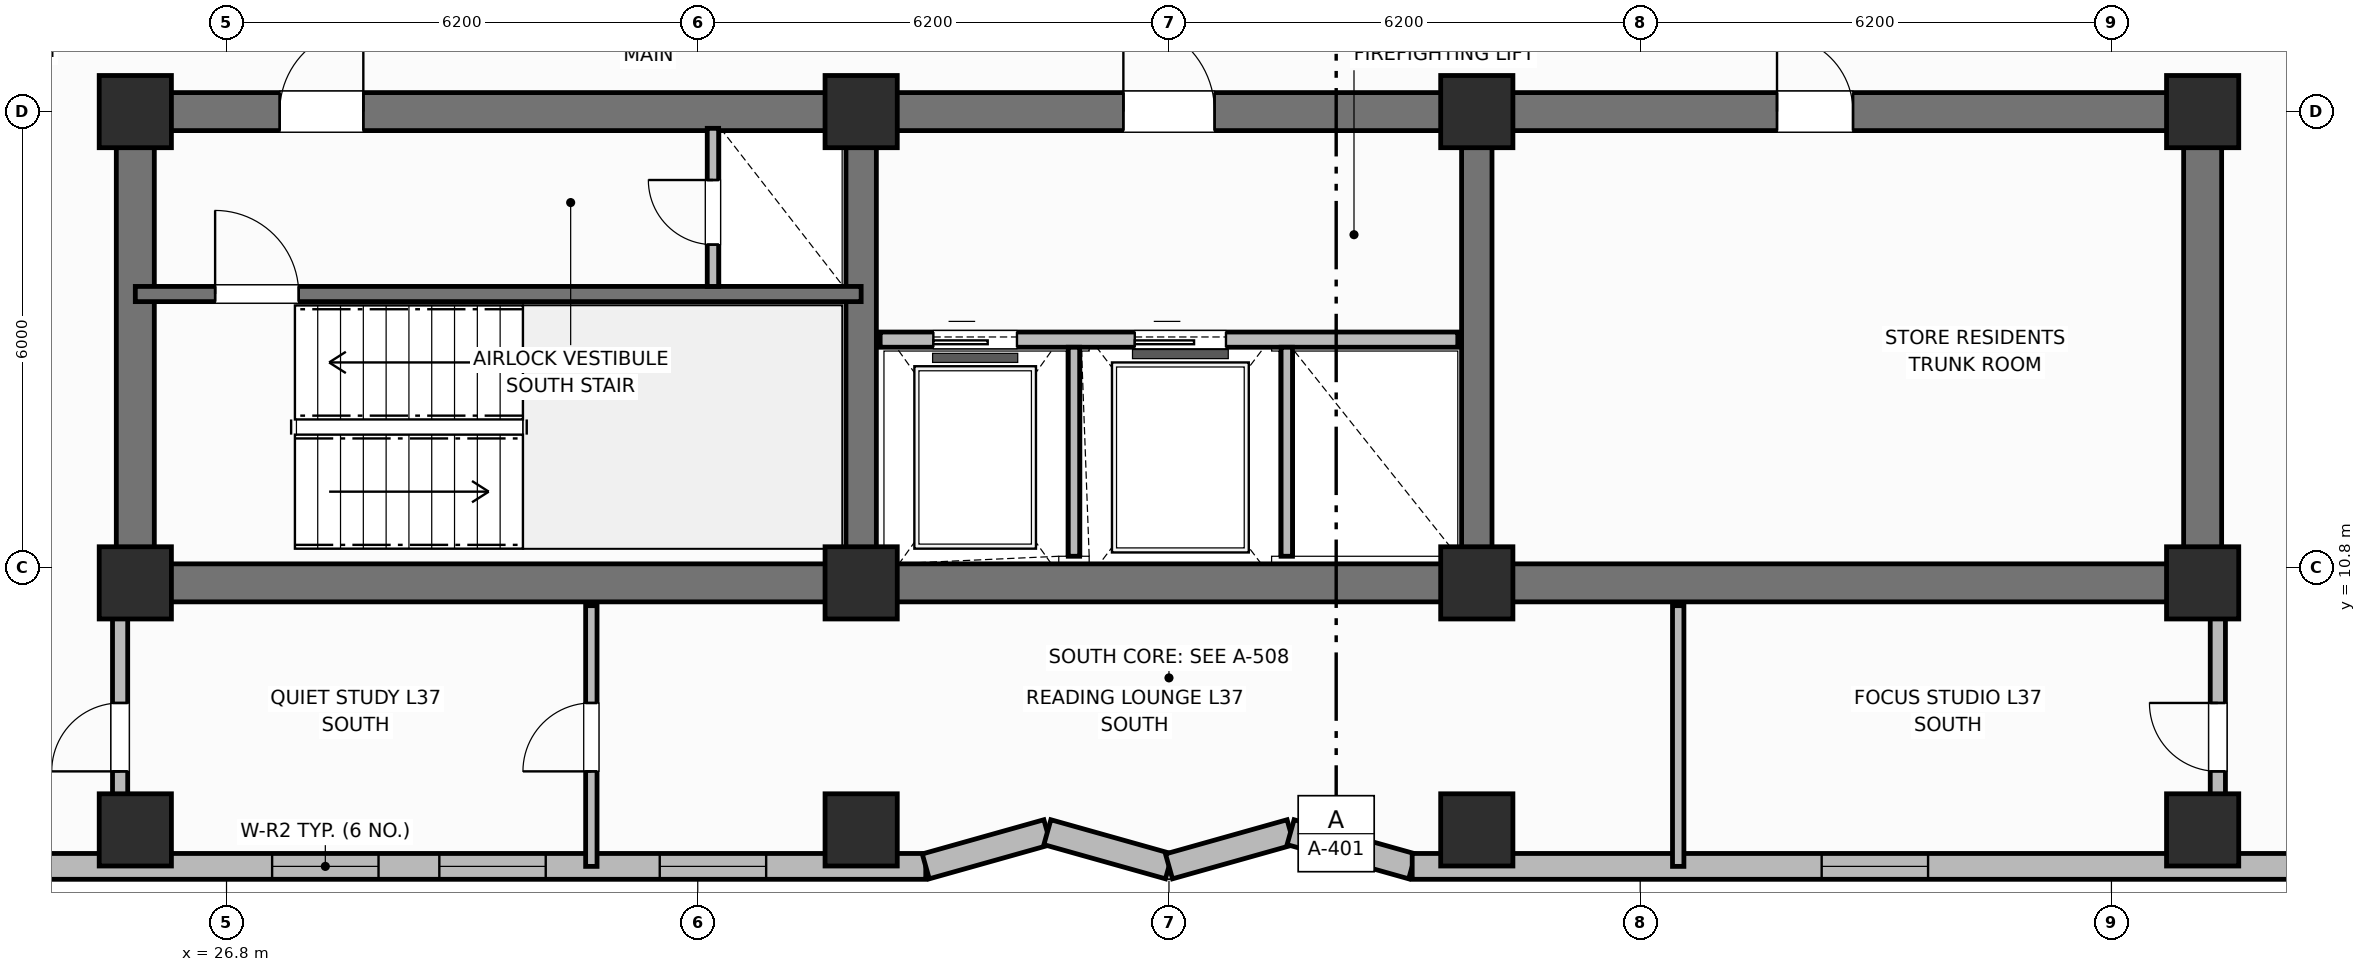
"""IFC4 building model, lengths in metres.
Left out: names, types, materials, properties, quantities, classifications, styles, units other than length and angle.
Written with IfcOpenShell. Run it as: python <this file> out.ifc"""

import sys

from ifc_helpers import new_model, si_unit, direction, frame, frame_2d, origin, origin_2d, place, context, subcontext, project, spatial, rectangle, extrude, element, fill, save


model = new_model("IFC4")
c1 = context("Model", 3, precision=1e-05, world=origin(), true_north=direction((0.0, 1.0)))
c2 = subcontext(c1, "Body", "Model", "MODEL_VIEW")
j1 = project(units=[si_unit("LENGTHUNIT", "METRE"), si_unit("PLANEANGLEUNIT", "RADIAN")], contexts=[c1])
p1 = place(None, origin())
s1 = spatial("IfcSite", under=j1, at=p1, CompositionType="ELEMENT")
p2 = place(p1, origin())
s2 = spatial("IfcBuilding", under=s1, at=p2, CompositionType="ELEMENT")
p3 = place(p2, frame((0.0, 0.0, 151.5)))
s3 = spatial("IfcBuildingStorey", under=s2, at=p3, CompositionType="ELEMENT", Elevation=151.5)
p4 = place(p3, frame((52.8, 10.6, 0.0), z_axis=(0.0, 0.0, 1.0), x_axis=(-1.0, 0.0, 0.0)))
e1 = element("IfcWall", 1, at=p4, inside=s3, PredefinedType="SHEAR", context=c2, shape_type="SweptSolid", body=[
    extrude(rectangle(XDim=27.2, YDim=0.5, at=frame_2d((13.6, 0.0))), origin(), (0.0, 0.0, 1.0), 3.7),
])
for number, where, z_axis, x_axis in (
    (2, (25.6, 10.85, 0.0), (0.0, 0.0, 1.0), (0.0, 1.0, 0.0)),
    (3, (52.8, 10.85, 0.0), (0.0, 0.0, 1.0), (0.0, 1.0, 0.0)),
):
    element("IfcWall", number, at=place(p3, frame(where, z_axis=z_axis, x_axis=x_axis)), inside=s3, PredefinedType="SHEAR", context=c2, shape_type="SweptSolid", body=[
        extrude(rectangle(XDim=5.7, YDim=0.5, at=frame_2d((2.85, 0.0))), origin(), (0.0, 0.0, 1.0), 3.7),
    ])
p5 = place(p3, frame((25.6, 16.8, 0.0), z_axis=(0.0, 0.0, 1.0), x_axis=(1.0, 0.0, 0.0)))
e4 = element("IfcWall", 4, at=p5, inside=s3, PredefinedType="SHEAR", context=c2, shape_type="SweptSolid", body=[
    extrude(rectangle(XDim=27.2, YDim=0.5, at=frame_2d((13.6, 0.0))), origin(), (0.0, 0.0, 1.0), 3.7),
])
p6 = place(p5, frame((1.9, 0.0, 0.0)))
e5 = element("IfcOpeningElement", 5, at=p6, cuts=e4, PredefinedType="OPENING", context=c2, shape_type="SweptSolid", body=[
    extrude(rectangle(XDim=1.1, YDim=2.15, at=frame_2d((0.55, 1.075))), frame((0.0, 0.26, 0.0), z_axis=(0.0, -1.0, 0.0), x_axis=(1.0, 0.0, 0.0)), (0.0, 0.0, 1.0), 0.52),
])
p7 = place(p5, frame((13.0, 0.0, 0.0)))
e6 = element("IfcOpeningElement", 6, at=p7, cuts=e4, PredefinedType="OPENING", context=c2, shape_type="SweptSolid", body=[
    extrude(rectangle(XDim=1.2, YDim=2.15, at=frame_2d((0.6, 1.075))), frame((0.0, 0.26, 0.0), z_axis=(0.0, -1.0, 0.0), x_axis=(1.0, 0.0, 0.0)), (0.0, 0.0, 1.0), 0.52),
])
p8 = place(p5, frame((21.6, 0.0, 0.0)))
e7 = element("IfcOpeningElement", 7, at=p8, cuts=e4, PredefinedType="OPENING", context=c2, shape_type="SweptSolid", body=[
    extrude(rectangle(XDim=1.0, YDim=2.15, at=frame_2d((0.5, 1.075))), frame((0.0, 0.26, 0.0), z_axis=(0.0, -1.0, 0.0), x_axis=(1.0, 0.0, 0.0)), (0.0, 0.0, 1.0), 0.52),
])
for number, where, z_axis, x_axis in (
    (8, (35.15, 10.85, 0.0), (0.0, 0.0, 1.0), (0.0, 1.0, 0.0)),
    (9, (43.25, 10.85, 0.0), (0.0, 0.0, 1.0), (0.0, 1.0, 0.0)),
):
    element("IfcWall", number, at=place(p3, frame(where, z_axis=z_axis, x_axis=x_axis)), inside=s3, PredefinedType="SHEAR", context=c2, shape_type="SweptSolid", body=[
        extrude(rectangle(XDim=5.7, YDim=0.4, at=frame_2d((2.85, 0.0))), origin(), (0.0, 0.0, 1.0), 3.7),
    ])
for number, where, z_axis, x_axis in (
    (10, (25.6, 10.6, 0.0), (0.0, 0.0, 1.0), (1.0, 0.0, 0.0)),
    (11, (25.6, 16.8, 0.0), (0.0, 0.0, 1.0), (1.0, 0.0, 0.0)),
    (12, (35.15, 10.6, 0.0), (0.0, 0.0, 1.0), (1.0, 0.0, 0.0)),
    (13, (35.15, 16.8, 0.0), (0.0, 0.0, 1.0), (1.0, 0.0, 0.0)),
    (14, (43.25, 10.6, 0.0), (0.0, 0.0, 1.0), (1.0, 0.0, 0.0)),
    (15, (43.25, 16.8, 0.0), (0.0, 0.0, 1.0), (1.0, 0.0, 0.0)),
    (16, (52.8, 10.6, 0.0), (0.0, 0.0, 1.0), (1.0, 0.0, 0.0)),
    (17, (52.8, 16.8, 0.0), (0.0, 0.0, 1.0), (1.0, 0.0, 0.0)),
    (18, (25.6, 7.35, 0.0), (0.0, 0.0, 1.0), (1.0, 0.0, 0.0)),
    (19, (35.15, 7.35, 0.0), (0.0, 0.0, 1.0), (1.0, 0.0, 0.0)),
    (20, (43.25, 7.35, 0.0), (0.0, 0.0, 1.0), (1.0, 0.0, 0.0)),
    (21, (52.8, 7.35, 0.0), (0.0, 0.0, 1.0), (1.0, 0.0, 0.0)),
):
    element("IfcColumn", number, at=place(p3, frame(where, z_axis=z_axis, x_axis=x_axis)), inside=s3, PredefinedType="COLUMN", context=c2, shape_type="SweptSolid", body=[
        extrude(rectangle(XDim=0.95, YDim=0.95, at=origin_2d()), origin(), (0.0, 0.0, 1.0), 3.7),
    ])
p9 = place(p3, frame((20.2, 6.87, 0.0), z_axis=(0.0, 0.0, 1.0), x_axis=(1.0, 0.0, 0.0)))
e22 = element("IfcWall", 22, at=p9, inside=s3, PredefinedType="SOLIDWALL", context=c2, shape_type="SweptSolid", body=[
    extrude(rectangle(XDim=15.8, YDim=0.34, at=frame_2d((7.9, 0.0))), origin(), (0.0, 0.0, 1.0), 2.72),
])
p10 = place(p9, frame((7.2, 0.0, 0.75)))
e23 = element("IfcOpeningElement", 23, at=p10, cuts=e22, PredefinedType="OPENING", context=c2, shape_type="SweptSolid", body=[
    extrude(rectangle(XDim=1.4, YDim=1.85, at=frame_2d((0.7, 0.925))), frame((0.0, 0.18, 0.0), z_axis=(0.0, -1.0, 0.0), x_axis=(1.0, 0.0, 0.0)), (0.0, 0.0, 1.0), 0.36),
])
p11 = place(p9, frame((9.4, 0.0, 0.75)))
e24 = element("IfcOpeningElement", 24, at=p11, cuts=e22, PredefinedType="OPENING", context=c2, shape_type="SweptSolid", body=[
    extrude(rectangle(XDim=1.4, YDim=1.85, at=frame_2d((0.7, 0.925))), frame((0.0, 0.18, 0.0), z_axis=(0.0, -1.0, 0.0), x_axis=(1.0, 0.0, 0.0)), (0.0, 0.0, 1.0), 0.36),
])
p12 = place(p9, frame((12.3, 0.0, 0.75)))
e25 = element("IfcOpeningElement", 25, at=p12, cuts=e22, PredefinedType="OPENING", context=c2, shape_type="SweptSolid", body=[
    extrude(rectangle(XDim=1.4, YDim=1.85, at=frame_2d((0.7, 0.925))), frame((0.0, 0.18, 0.0), z_axis=(0.0, -1.0, 0.0), x_axis=(1.0, 0.0, 0.0)), (0.0, 0.0, 1.0), 0.36),
])
p13 = place(p3, frame((36.0, 6.87, 0.0), z_axis=(0.0, 0.0, 1.0), x_axis=(0.962662902433, 0.270703040766, 0.0)))
e26 = element("IfcWall", 26, at=p13, inside=s3, PredefinedType="SOLIDWALL", context=c2, shape_type="SweptSolid", body=[
    extrude(rectangle(XDim=1.662, YDim=0.34, at=frame_2d((0.831, 0.0))), origin(), (0.0, 0.0, 1.0), 2.72),
])
p14 = place(p3, frame((37.6, 7.32, 0.0), z_axis=(0.0, 0.0, 1.0), x_axis=(0.962652136636, -0.270741322725, 0.0)))
e27 = element("IfcWall", 27, at=p14, inside=s3, PredefinedType="SOLIDWALL", context=c2, shape_type="SweptSolid", body=[
    extrude(rectangle(XDim=1.662, YDim=0.34, at=frame_2d((0.831, 0.0))), origin(), (0.0, 0.0, 1.0), 2.72),
])
p15 = place(p3, frame((39.2, 6.87, 0.0), z_axis=(0.0, 0.0, 1.0), x_axis=(0.962662902433, 0.270703040766, 0.0)))
e28 = element("IfcWall", 28, at=p15, inside=s3, PredefinedType="SOLIDWALL", context=c2, shape_type="SweptSolid", body=[
    extrude(rectangle(XDim=1.662, YDim=0.34, at=frame_2d((0.831, 0.0))), origin(), (0.0, 0.0, 1.0), 2.72),
])
p16 = place(p3, frame((40.8, 7.32, 0.0), z_axis=(0.0, 0.0, 1.0), x_axis=(0.962652136636, -0.270741322725, 0.0)))
e29 = element("IfcWall", 29, at=p16, inside=s3, PredefinedType="SOLIDWALL", context=c2, shape_type="SweptSolid", body=[
    extrude(rectangle(XDim=1.662, YDim=0.34, at=frame_2d((0.831, 0.0))), origin(), (0.0, 0.0, 1.0), 2.72),
])
p17 = place(p3, frame((42.4, 6.87, 0.0), z_axis=(0.0, 0.0, 1.0), x_axis=(1.0, 0.0, 0.0)))
e30 = element("IfcWall", 30, at=p17, inside=s3, PredefinedType="SOLIDWALL", context=c2, shape_type="SweptSolid", body=[
    extrude(rectangle(XDim=15.8, YDim=0.34, at=frame_2d((7.9, 0.0))), origin(), (0.0, 0.0, 1.0), 2.72),
])
p18 = place(p17, frame((5.387, 0.0, 0.75)))
e31 = element("IfcOpeningElement", 31, at=p18, cuts=e30, PredefinedType="OPENING", context=c2, shape_type="SweptSolid", body=[
    extrude(rectangle(XDim=1.4, YDim=1.85, at=frame_2d((0.7, 0.925))), frame((0.0, 0.18, 0.0), z_axis=(0.0, -1.0, 0.0), x_axis=(1.0, 0.0, 0.0)), (0.0, 0.0, 1.0), 0.36),
])
p19 = place(p3, frame((25.6, 14.4, 0.0), z_axis=(0.0, 0.0, 1.0), x_axis=(1.0, 0.0, 0.0)))
e32 = element("IfcWall", 32, at=p19, inside=s3, PredefinedType="SHEAR", context=c2, shape_type="SweptSolid", body=[
    extrude(rectangle(XDim=9.55, YDim=0.2, at=frame_2d((4.775, 0.0))), origin(), (0.0, 0.0, 1.0), 3.7),
])
p20 = place(p19, frame((1.05, 0.0, 0.0)))
e33 = element("IfcOpeningElement", 33, at=p20, cuts=e32, PredefinedType="OPENING", context=c2, shape_type="SweptSolid", body=[
    extrude(rectangle(XDim=1.1, YDim=2.15, at=frame_2d((0.55, 1.075))), frame((0.0, 0.11, 0.0), z_axis=(0.0, -1.0, 0.0), x_axis=(1.0, 0.0, 0.0)), (0.0, 0.0, 1.0), 0.22),
])
p21 = place(p3, frame((33.2, 14.5, 0.0), z_axis=(0.0, 0.0, 1.0), x_axis=(0.0, 1.0, 0.0)))
e34 = element("IfcWall", 34, at=p21, inside=s3, PredefinedType="PARTITIONING", context=c2, shape_type="SweptSolid", body=[
    extrude(rectangle(XDim=2.08, YDim=0.15, at=frame_2d((1.04, 0.0))), origin(), (0.0, 0.0, 1.0), 2.55),
])
p22 = place(p21, frame((0.55, 0.0, 0.0)))
e35 = element("IfcOpeningElement", 35, at=p22, cuts=e34, PredefinedType="OPENING", context=c2, shape_type="SweptSolid", body=[
    extrude(rectangle(XDim=0.85, YDim=2.05, at=frame_2d((0.425, 1.025))), frame((0.0, 0.085, 0.0), z_axis=(0.0, -1.0, 0.0), x_axis=(1.0, 0.0, 0.0)), (0.0, 0.0, 1.0), 0.17),
])
p23 = place(p3, frame((35.4, 13.8, 0.0), z_axis=(0.0, 0.0, 1.0), x_axis=(1.0, 0.0, 0.0)))
e36 = element("IfcWall", 36, at=p23, inside=s3, PredefinedType="PARTITIONING", context=c2, shape_type="SweptSolid", body=[
    extrude(rectangle(XDim=7.6, YDim=0.2, at=frame_2d((3.8, 0.0))), origin(), (0.0, 0.0, 1.0), 2.32),
])
p24 = place(p23, frame((0.7, 0.0, 0.0)))
e37 = element("IfcOpeningElement", 37, at=p24, cuts=e36, PredefinedType="OPENING", context=c2, shape_type="SweptSolid", body=[
    extrude(rectangle(XDim=1.1, YDim=2.15, at=frame_2d((0.55, 1.075))), frame((0.0, 0.11, 0.0), z_axis=(0.0, -1.0, 0.0), x_axis=(1.0, 0.0, 0.0)), (0.0, 0.0, 1.0), 0.22),
])
p25 = place(p23, frame((3.35, 0.0, 0.0)))
e38 = element("IfcOpeningElement", 38, at=p25, cuts=e36, PredefinedType="OPENING", context=c2, shape_type="SweptSolid", body=[
    extrude(rectangle(XDim=1.2, YDim=2.15, at=frame_2d((0.6, 1.075))), frame((0.0, 0.11, 0.0), z_axis=(0.0, -1.0, 0.0), x_axis=(1.0, 0.0, 0.0)), (0.0, 0.0, 1.0), 0.22),
])
for number, where, z_axis, x_axis in (
    (39, (37.95, 10.95, 0.0), (0.0, 0.0, 1.0), (0.0, 1.0, 0.0)),
    (40, (40.75, 10.95, 0.0), (0.0, 0.0, 1.0), (0.0, 1.0, 0.0)),
):
    element("IfcWall", number, at=place(p3, frame(where, z_axis=z_axis, x_axis=x_axis)), inside=s3, PredefinedType="PARTITIONING", context=c2, shape_type="SweptSolid", body=[
        extrude(rectangle(XDim=2.75, YDim=0.15, at=frame_2d((1.375, 0.0))), origin(), (0.0, 0.0, 1.0), 2.55),
    ])
p26 = place(p3, frame((31.6, 6.87, 0.0), z_axis=(0.0, 0.0, 1.0), x_axis=(0.0, 1.0, 0.0)))
e41 = element("IfcWall", 41, at=p26, inside=s3, PredefinedType="PARTITIONING", context=c2, shape_type="SweptSolid", body=[
    extrude(rectangle(XDim=3.43, YDim=0.15, at=frame_2d((1.715, 0.0))), origin(), (0.0, 0.0, 1.0), 2.55),
])
p27 = place(p26, frame((1.25, 0.0, 0.0)))
e42 = element("IfcOpeningElement", 42, at=p27, cuts=e41, PredefinedType="OPENING", context=c2, shape_type="SweptSolid", body=[
    extrude(rectangle(XDim=0.9, YDim=2.1, at=frame_2d((0.45, 1.05))), frame((0.0, 0.085, 0.0), z_axis=(0.0, -1.0, 0.0), x_axis=(1.0, 0.0, 0.0)), (0.0, 0.0, 1.0), 0.17),
])
p28 = place(p3, frame((45.9, 6.87, 0.0), z_axis=(0.0, 0.0, 1.0), x_axis=(0.0, 1.0, 0.0)))
e43 = element("IfcWall", 43, at=p28, inside=s3, PredefinedType="PARTITIONING", context=c2, shape_type="SweptSolid", body=[
    extrude(rectangle(XDim=3.43, YDim=0.15, at=frame_2d((1.715, 0.0))), origin(), (0.0, 0.0, 1.0), 2.55),
])
p29 = place(p3, frame((25.4, 7.47, 0.0), z_axis=(0.0, 0.0, 1.0), x_axis=(0.0, 1.0, 0.0)))
e44 = element("IfcWall", 44, at=p29, inside=s3, PredefinedType="PARTITIONING", context=c2, shape_type="SweptSolid", body=[
    extrude(rectangle(XDim=2.83, YDim=0.2, at=frame_2d((1.415, 0.0))), origin(), (0.0, 0.0, 1.0), 2.55),
])
p30 = place(p29, frame((0.65, 0.0, 0.0)))
e45 = element("IfcOpeningElement", 45, at=p30, cuts=e44, PredefinedType="OPENING", context=c2, shape_type="SweptSolid", body=[
    extrude(rectangle(XDim=0.9, YDim=2.1, at=frame_2d((0.45, 1.05))), frame((0.0, 0.11, 0.0), z_axis=(0.0, -1.0, 0.0), x_axis=(1.0, 0.0, 0.0)), (0.0, 0.0, 1.0), 0.22),
])
p31 = place(p3, frame((53.0, 7.47, 0.0), z_axis=(0.0, 0.0, 1.0), x_axis=(0.0, 1.0, 0.0)))
e46 = element("IfcWall", 46, at=p31, inside=s3, PredefinedType="PARTITIONING", context=c2, shape_type="SweptSolid", body=[
    extrude(rectangle(XDim=2.83, YDim=0.2, at=frame_2d((1.415, 0.0))), origin(), (0.0, 0.0, 1.0), 2.55),
])
p32 = place(p31, frame((0.65, 0.0, 0.0)))
e47 = element("IfcOpeningElement", 47, at=p32, cuts=e46, PredefinedType="OPENING", context=c2, shape_type="SweptSolid", body=[
    extrude(rectangle(XDim=0.9, YDim=2.1, at=frame_2d((0.45, 1.05))), frame((0.0, 0.11, 0.0), z_axis=(0.0, -1.0, 0.0), x_axis=(1.0, 0.0, 0.0)), (0.0, 0.0, 1.0), 0.22),
])
p33 = place(p10, origin())
e48 = element("IfcWindow", 48, at=p33, inside=s3, PartitioningType="SINGLE_PANEL", PredefinedType="WINDOW", context=c2, shape_type="SweptSolid", body=[
    extrude(rectangle(XDim=1.4, YDim=1.85, at=frame_2d((0.7, 0.925))), frame((0.0, 0.03, 0.0), z_axis=(0.0, -1.0, 0.0), x_axis=(1.0, 0.0, 0.0)), (0.0, 0.0, 1.0), 0.06),
])
fill(e23, e48)
p34 = place(p11, origin())
e49 = element("IfcWindow", 49, at=p34, inside=s3, PartitioningType="SINGLE_PANEL", PredefinedType="WINDOW", context=c2, shape_type="SweptSolid", body=[
    extrude(rectangle(XDim=1.4, YDim=1.85, at=frame_2d((0.7, 0.925))), frame((0.0, 0.03, 0.0), z_axis=(0.0, -1.0, 0.0), x_axis=(1.0, 0.0, 0.0)), (0.0, 0.0, 1.0), 0.06),
])
fill(e24, e49)
p35 = place(p12, origin())
e50 = element("IfcWindow", 50, at=p35, inside=s3, PartitioningType="SINGLE_PANEL", PredefinedType="WINDOW", context=c2, shape_type="SweptSolid", body=[
    extrude(rectangle(XDim=1.4, YDim=1.85, at=frame_2d((0.7, 0.925))), frame((0.0, 0.03, 0.0), z_axis=(0.0, -1.0, 0.0), x_axis=(1.0, 0.0, 0.0)), (0.0, 0.0, 1.0), 0.06),
])
fill(e25, e50)
p36 = place(p18, origin())
e51 = element("IfcWindow", 51, at=p36, inside=s3, PartitioningType="SINGLE_PANEL", PredefinedType="WINDOW", context=c2, shape_type="SweptSolid", body=[
    extrude(rectangle(XDim=1.4, YDim=1.85, at=frame_2d((0.7, 0.925))), frame((0.0, 0.03, 0.0), z_axis=(0.0, -1.0, 0.0), x_axis=(1.0, 0.0, 0.0)), (0.0, 0.0, 1.0), 0.06),
])
fill(e31, e51)
p37 = place(p20, origin())
e52 = element("IfcDoor", 52, at=p37, inside=s3, OperationType="SINGLE_SWING_LEFT", PredefinedType="DOOR", context=c2, shape_type="SweptSolid", body=[
    extrude(rectangle(XDim=1.1, YDim=2.15, at=frame_2d((0.55, 1.075))), frame((0.0, 0.025, 0.0), z_axis=(0.0, -1.0, 0.0), x_axis=(1.0, 0.0, 0.0)), (0.0, 0.0, 1.0), 0.05),
])
fill(e33, e52)
p38 = place(p22, origin())
e53 = element("IfcDoor", 53, at=p38, inside=s3, OperationType="SINGLE_SWING_RIGHT", PredefinedType="TRAPDOOR", context=c2, shape_type="SweptSolid", body=[
    extrude(rectangle(XDim=0.85, YDim=2.05, at=frame_2d((0.425, 1.025))), frame((0.0, 0.025, 0.0), z_axis=(0.0, -1.0, 0.0), x_axis=(1.0, 0.0, 0.0)), (0.0, 0.0, 1.0), 0.05),
])
fill(e35, e53)
p39 = place(p24, origin())
e54 = element("IfcDoor", 54, at=p39, inside=s3, OperationType="SLIDING_TO_LEFT", PredefinedType="DOOR", context=c2, shape_type="SweptSolid", body=[
    extrude(rectangle(XDim=1.1, YDim=2.15, at=frame_2d((0.55, 1.075))), frame((0.0, 0.025, 0.0), z_axis=(0.0, -1.0, 0.0), x_axis=(1.0, 0.0, 0.0)), (0.0, 0.0, 1.0), 0.05),
])
fill(e37, e54)
p40 = place(p25, origin())
e55 = element("IfcDoor", 55, at=p40, inside=s3, OperationType="SLIDING_TO_LEFT", PredefinedType="DOOR", context=c2, shape_type="SweptSolid", body=[
    extrude(rectangle(XDim=1.2, YDim=2.15, at=frame_2d((0.6, 1.075))), frame((0.0, 0.025, 0.0), z_axis=(0.0, -1.0, 0.0), x_axis=(1.0, 0.0, 0.0)), (0.0, 0.0, 1.0), 0.05),
])
fill(e38, e55)
p41 = place(p27, origin())
e56 = element("IfcDoor", 56, at=p41, inside=s3, OperationType="SINGLE_SWING_LEFT", PredefinedType="DOOR", context=c2, shape_type="SweptSolid", body=[
    extrude(rectangle(XDim=0.9, YDim=2.1, at=frame_2d((0.45, 1.05))), frame((0.0, 0.025, 0.0), z_axis=(0.0, -1.0, 0.0), x_axis=(1.0, 0.0, 0.0)), (0.0, 0.0, 1.0), 0.05),
])
fill(e42, e56)
p42 = place(p30, origin())
e57 = element("IfcDoor", 57, at=p42, inside=s3, OperationType="SINGLE_SWING_LEFT", PredefinedType="DOOR", context=c2, shape_type="SweptSolid", body=[
    extrude(rectangle(XDim=0.9, YDim=2.1, at=frame_2d((0.45, 1.05))), frame((0.0, 0.025, 0.0), z_axis=(0.0, -1.0, 0.0), x_axis=(1.0, 0.0, 0.0)), (0.0, 0.0, 1.0), 0.05),
])
fill(e45, e57)
p43 = place(p32, origin())
e58 = element("IfcDoor", 58, at=p43, inside=s3, OperationType="SINGLE_SWING_RIGHT", PredefinedType="DOOR", context=c2, shape_type="SweptSolid", body=[
    extrude(rectangle(XDim=0.9, YDim=2.1, at=frame_2d((0.45, 1.05))), frame((0.0, 0.025, 0.0), z_axis=(0.0, -1.0, 0.0), x_axis=(1.0, 0.0, 0.0)), (0.0, 0.0, 1.0), 0.05),
])
fill(e47, e58)
p44 = place(p6, origin())
e59 = element("IfcDoor", 59, at=p44, inside=s3, OperationType="SINGLE_SWING_RIGHT", PredefinedType="DOOR", context=c2, shape_type="SweptSolid", body=[
    extrude(rectangle(XDim=1.1, YDim=2.15, at=frame_2d((0.55, 1.075))), frame((0.0, 0.025, 0.0), z_axis=(0.0, -1.0, 0.0), x_axis=(1.0, 0.0, 0.0)), (0.0, 0.0, 1.0), 0.05),
])
fill(e5, e59)
p45 = place(p7, origin())
e60 = element("IfcDoor", 60, at=p45, inside=s3, OperationType="SINGLE_SWING_LEFT", PredefinedType="DOOR", context=c2, shape_type="SweptSolid", body=[
    extrude(rectangle(XDim=1.2, YDim=2.15, at=frame_2d((0.6, 1.075))), frame((0.0, 0.025, 0.0), z_axis=(0.0, -1.0, 0.0), x_axis=(1.0, 0.0, 0.0)), (0.0, 0.0, 1.0), 0.05),
])
fill(e6, e60)
p46 = place(p8, origin())
e61 = element("IfcDoor", 61, at=p46, inside=s3, OperationType="SINGLE_SWING_LEFT", PredefinedType="DOOR", context=c2, shape_type="SweptSolid", body=[
    extrude(rectangle(XDim=1.0, YDim=2.15, at=frame_2d((0.5, 1.075))), frame((0.0, 0.025, 0.0), z_axis=(0.0, -1.0, 0.0), x_axis=(1.0, 0.0, 0.0)), (0.0, 0.0, 1.0), 0.05),
])
fill(e7, e61)
save(model, sys.argv[1])
